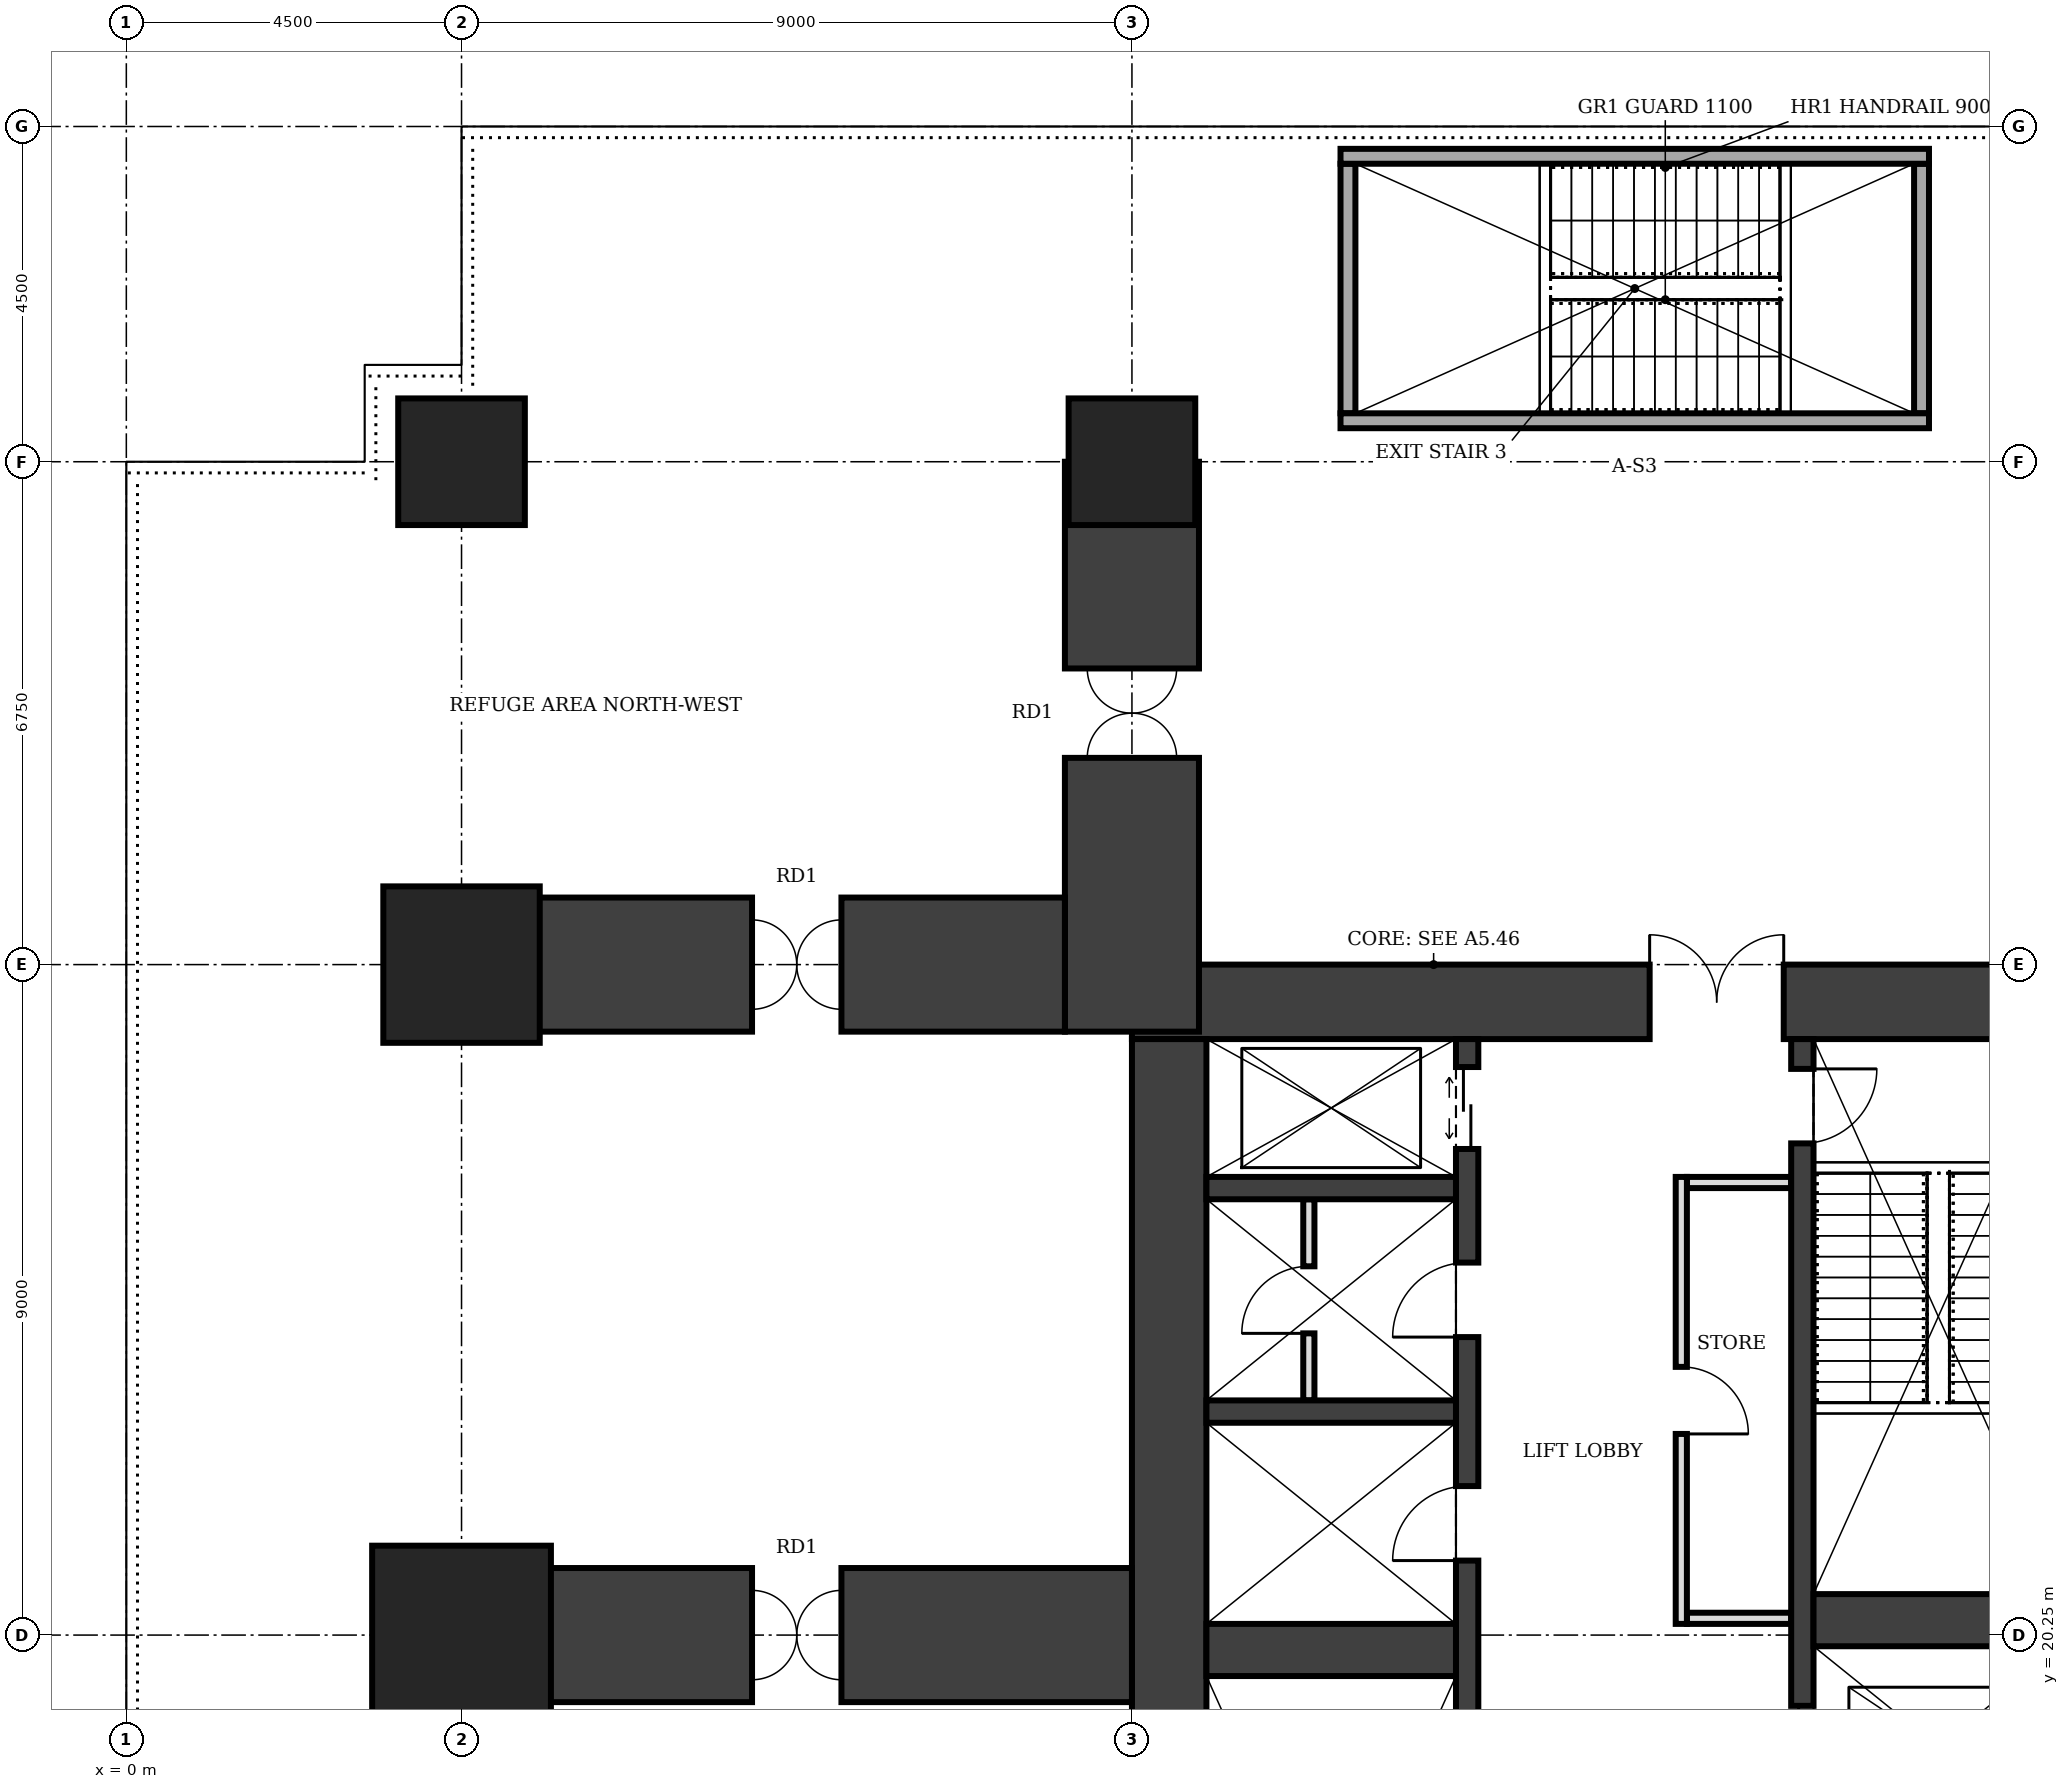
"""IFC4 building model, lengths in metres.
Left out: names, types, materials, properties, quantities, classifications, styles, units other than length and angle.
Written with IfcOpenShell. Run it as: python <this file> out.ifc"""

import sys

from ifc_helpers import new_model, si_unit, direction, frame, frame_2d, origin, origin_2d, place, context, subcontext, project, spatial, rectangle, extrude, element, fill, save


model = new_model("IFC4")
c1 = context("Model", 3, precision=1e-05, world=origin(), true_north=direction((0.0, 1.0)))
c2 = subcontext(c1, "Body", "Model", "MODEL_VIEW")
j1 = project(units=[si_unit("LENGTHUNIT", "METRE"), si_unit("PLANEANGLEUNIT", "RADIAN")], contexts=[c1])
p1 = place(None, origin())
s1 = spatial("IfcSite", under=j1, at=p1, CompositionType="ELEMENT")
p2 = place(p1, origin())
s2 = spatial("IfcBuilding", under=s1, at=p2, CompositionType="ELEMENT")
p3 = place(p2, frame((0.0, 0.0, 169.0)))
s3 = spatial("IfcBuildingStorey", under=s2, at=p3, CompositionType="ELEMENT", Elevation=169.0)
p4 = place(p3, frame((27.0, 28.75, 0.0), z_axis=(0.0, 0.0, 1.0), x_axis=(-1.0, 0.0, 0.0)))
e1 = element("IfcWall", 1, at=p4, inside=s3, PredefinedType="SHEAR", context=c2, shape_type="SweptSolid", body=[
    extrude(rectangle(XDim=13.5, YDim=1.0, at=frame_2d((6.75, 0.0))), origin(), (0.0, 0.0, 1.0), 8.0),
])
p5 = place(p4, frame((4.75, 0.0, 0.0)))
e2 = element("IfcOpeningElement", 2, at=p5, cuts=e1, PredefinedType="OPENING", context=c2, shape_type="SweptSolid", body=[
    extrude(rectangle(XDim=1.8, YDim=2.1, at=frame_2d((0.9, 1.05))), frame((0.0, 0.51, 0.0), z_axis=(0.0, -1.0, 0.0), x_axis=(1.0, 0.0, 0.0)), (0.0, 0.0, 1.0), 1.02),
])
p6 = place(p3, frame((14.0, 28.25, 0.0), z_axis=(0.0, 0.0, 1.0), x_axis=(0.0, -1.0, 0.0)))
e3 = element("IfcWall", 3, at=p6, inside=s3, PredefinedType="SHEAR", context=c2, shape_type="SweptSolid", body=[
    extrude(rectangle(XDim=16.0, YDim=1.0, at=frame_2d((8.0, 0.0))), origin(), (0.0, 0.0, 1.0), 8.0),
])
p7 = place(p3, frame((18.0, 12.25, 0.0), z_axis=(0.0, 0.0, 1.0), x_axis=(0.0, 1.0, 0.0)))
e4 = element("IfcWall", 4, at=p7, inside=s3, PredefinedType="SHEAR", context=c2, shape_type="SweptSolid", body=[
    extrude(rectangle(XDim=16.0, YDim=0.3, at=frame_2d((8.0, 0.0))), origin(), (0.0, 0.0, 1.0), 8.0),
])
p8 = place(p7, frame((0.4, 0.0, 0.0)))
e5 = element("IfcOpeningElement", 5, at=p8, cuts=e4, PredefinedType="OPENING", context=c2, shape_type="SweptSolid", body=[
    extrude(rectangle(XDim=1.0, YDim=2.1, at=frame_2d((0.5, 1.05))), frame((0.0, 0.16, 0.0), z_axis=(0.0, -1.0, 0.0), x_axis=(1.0, 0.0, 0.0)), (0.0, 0.0, 1.0), 0.32),
])
p9 = place(p7, frame((14.525, 0.0, 0.0)))
e6 = element("IfcOpeningElement", 6, at=p9, cuts=e4, PredefinedType="OPENING", context=c2, shape_type="SweptSolid", body=[
    extrude(rectangle(XDim=1.1, YDim=2.1, at=frame_2d((0.55, 1.05))), frame((0.0, 0.16, 0.0), z_axis=(0.0, -1.0, 0.0), x_axis=(1.0, 0.0, 0.0)), (0.0, 0.0, 1.0), 0.32),
])
p10 = place(p7, frame((9.0, 0.0, 0.0)))
e7 = element("IfcOpeningElement", 7, at=p10, cuts=e4, PredefinedType="OPENING", context=c2, shape_type="SweptSolid", body=[
    extrude(rectangle(XDim=1.0, YDim=2.1, at=frame_2d((0.5, 1.05))), frame((0.0, 0.16, 0.0), z_axis=(0.0, -1.0, 0.0), x_axis=(1.0, 0.0, 0.0)), (0.0, 0.0, 1.0), 0.32),
])
p11 = place(p7, frame((12.0, 0.0, 0.0)))
e8 = element("IfcOpeningElement", 8, at=p11, cuts=e4, PredefinedType="OPENING", context=c2, shape_type="SweptSolid", body=[
    extrude(rectangle(XDim=1.0, YDim=2.1, at=frame_2d((0.5, 1.05))), frame((0.0, 0.16, 0.0), z_axis=(0.0, -1.0, 0.0), x_axis=(1.0, 0.0, 0.0)), (0.0, 0.0, 1.0), 0.32),
])
p12 = place(p3, frame((22.5, 12.25, 0.0), z_axis=(0.0, 0.0, 1.0), x_axis=(0.0, 1.0, 0.0)))
e9 = element("IfcWall", 9, at=p12, inside=s3, PredefinedType="SHEAR", context=c2, shape_type="SweptSolid", body=[
    extrude(rectangle(XDim=16.0, YDim=0.3, at=frame_2d((8.0, 0.0))), origin(), (0.0, 0.0, 1.0), 8.0),
])
p13 = place(p12, frame((14.6, 0.0, 0.0)))
e10 = element("IfcOpeningElement", 10, at=p13, cuts=e9, PredefinedType="OPENING", context=c2, shape_type="SweptSolid", body=[
    extrude(rectangle(XDim=1.0, YDim=2.1, at=frame_2d((0.5, 1.05))), frame((0.0, 0.16, 0.0), z_axis=(0.0, -1.0, 0.0), x_axis=(1.0, 0.0, 0.0)), (0.0, 0.0, 1.0), 0.32),
])
p14 = place(p12, frame((0.375, 0.0, 0.0)))
e11 = element("IfcOpeningElement", 11, at=p14, cuts=e9, PredefinedType="OPENING", context=c2, shape_type="SweptSolid", body=[
    extrude(rectangle(XDim=1.1, YDim=2.1, at=frame_2d((0.55, 1.05))), frame((0.0, 0.16, 0.0), z_axis=(0.0, -1.0, 0.0), x_axis=(1.0, 0.0, 0.0)), (0.0, 0.0, 1.0), 0.32),
])
p15 = place(p12, frame((3.7, 0.0, 0.0)))
e12 = element("IfcOpeningElement", 12, at=p15, cuts=e9, PredefinedType="OPENING", context=c2, shape_type="SweptSolid", body=[
    extrude(rectangle(XDim=1.1, YDim=2.1, at=frame_2d((0.55, 1.05))), frame((0.0, 0.16, 0.0), z_axis=(0.0, -1.0, 0.0), x_axis=(1.0, 0.0, 0.0)), (0.0, 0.0, 1.0), 0.32),
])
p16 = place(p12, frame((5.95, 0.0, 0.0)))
e13 = element("IfcOpeningElement", 13, at=p16, cuts=e9, PredefinedType="OPENING", context=c2, shape_type="SweptSolid", body=[
    extrude(rectangle(XDim=1.1, YDim=2.1, at=frame_2d((0.55, 1.05))), frame((0.0, 0.16, 0.0), z_axis=(0.0, -1.0, 0.0), x_axis=(1.0, 0.0, 0.0)), (0.0, 0.0, 1.0), 0.32),
])
for number, where, z_axis, x_axis in (
    (14, (14.5, 20.05, 0.0), (0.0, 0.0, 1.0), (1.0, 0.0, 0.0)),
    (15, (22.65, 20.45, 0.0), (0.0, 0.0, 1.0), (1.0, 0.0, 0.0)),
):
    element("IfcWall", number, at=place(p3, frame(where, z_axis=z_axis, x_axis=x_axis)), inside=s3, PredefinedType="SHEAR", context=c2, shape_type="SweptSolid", body=[
        extrude(rectangle(XDim=3.35, YDim=0.7, at=frame_2d((1.675, 0.0))), origin(), (0.0, 0.0, 1.0), 8.0),
    ])
for number, where, z_axis, x_axis in (
    (16, (14.5, 23.25, 0.0), (0.0, 0.0, 1.0), (1.0, 0.0, 0.0)),
    (17, (14.5, 26.25, 0.0), (0.0, 0.0, 1.0), (1.0, 0.0, 0.0)),
):
    element("IfcWall", number, at=place(p3, frame(where, z_axis=z_axis, x_axis=x_axis)), inside=s3, PredefinedType="SHEAR", context=c2, shape_type="SweptSolid", body=[
        extrude(rectangle(XDim=3.35, YDim=0.3, at=frame_2d((1.675, 0.0))), origin(), (0.0, 0.0, 1.0), 8.0),
    ])
p17 = place(p3, frame((4.5, 20.25, 0.0), z_axis=(0.0, 0.0, 1.0), x_axis=(1.0, 0.0, 0.0)))
e18 = element("IfcColumn", 18, at=p17, inside=s3, PredefinedType="COLUMN", context=c2, shape_type="SweptSolid", body=[
    extrude(rectangle(XDim=2.4, YDim=2.4, at=origin_2d()), origin(), (0.0, 0.0, 1.0), 8.0),
])
p18 = place(p3, frame((4.5, 29.25, 0.0), z_axis=(0.0, 0.0, 1.0), x_axis=(1.0, 0.0, 0.0)))
e19 = element("IfcColumn", 19, at=p18, inside=s3, PredefinedType="COLUMN", context=c2, shape_type="SweptSolid", body=[
    extrude(rectangle(XDim=2.1, YDim=2.1, at=origin_2d()), origin(), (0.0, 0.0, 1.0), 8.0),
])
for number, where, z_axis, x_axis in (
    (20, (4.5, 36.0, 0.0), (0.0, 0.0, 1.0), (1.0, 0.0, 0.0)),
    (21, (13.5, 36.0, 0.0), (0.0, 0.0, 1.0), (1.0, 0.0, 0.0)),
):
    element("IfcColumn", number, at=place(p3, frame(where, z_axis=z_axis, x_axis=x_axis)), inside=s3, PredefinedType="COLUMN", context=c2, shape_type="SweptSolid", body=[
        extrude(rectangle(XDim=1.7, YDim=1.7, at=origin_2d()), origin(), (0.0, 0.0, 1.0), 8.0),
    ])
p19 = place(p3, frame((13.5, 28.35, 0.0), z_axis=(0.0, 0.0, 1.0), x_axis=(0.0, 1.0, 0.0)))
e22 = element("IfcWall", 22, at=p19, inside=s3, PredefinedType="SHEAR", context=c2, shape_type="SweptSolid", body=[
    extrude(rectangle(XDim=7.65, YDim=1.8, at=frame_2d((3.825, 0.0))), origin(), (0.0, 0.0, 1.0), 8.0),
])
p20 = place(p19, frame((3.675, 0.0, 0.0)))
e23 = element("IfcOpeningElement", 23, at=p20, cuts=e22, PredefinedType="OPENING", context=c2, shape_type="SweptSolid", body=[
    extrude(rectangle(XDim=1.2, YDim=2.1, at=frame_2d((0.6, 1.05))), frame((0.0, 0.91, 0.0), z_axis=(0.0, -1.0, 0.0), x_axis=(1.0, 0.0, 0.0)), (0.0, 0.0, 1.0), 1.82),
])
p21 = place(p3, frame((4.5, 20.25, 0.0), z_axis=(0.0, 0.0, 1.0), x_axis=(1.0, 0.0, 0.0)))
e24 = element("IfcWall", 24, at=p21, inside=s3, PredefinedType="SHEAR", context=c2, shape_type="SweptSolid", body=[
    extrude(rectangle(XDim=9.0, YDim=1.8, at=frame_2d((4.5, 0.0))), origin(), (0.0, 0.0, 1.0), 8.0),
])
p22 = place(p21, frame((3.9, 0.0, 0.0)))
e25 = element("IfcOpeningElement", 25, at=p22, cuts=e24, PredefinedType="OPENING", context=c2, shape_type="SweptSolid", body=[
    extrude(rectangle(XDim=1.2, YDim=2.1, at=frame_2d((0.6, 1.05))), frame((0.0, 0.91, 0.0), z_axis=(0.0, -1.0, 0.0), x_axis=(1.0, 0.0, 0.0)), (0.0, 0.0, 1.0), 1.82),
])
p23 = place(p3, frame((4.5, 29.25, 0.0), z_axis=(0.0, 0.0, 1.0), x_axis=(1.0, 0.0, 0.0)))
e26 = element("IfcWall", 26, at=p23, inside=s3, PredefinedType="SHEAR", context=c2, shape_type="SweptSolid", body=[
    extrude(rectangle(XDim=8.1, YDim=1.8, at=frame_2d((4.05, 0.0))), origin(), (0.0, 0.0, 1.0), 8.0),
])
p24 = place(p23, frame((3.9, 0.0, 0.0)))
e27 = element("IfcOpeningElement", 27, at=p24, cuts=e26, PredefinedType="OPENING", context=c2, shape_type="SweptSolid", body=[
    extrude(rectangle(XDim=1.2, YDim=2.1, at=frame_2d((0.6, 1.05))), frame((0.0, 0.91, 0.0), z_axis=(0.0, -1.0, 0.0), x_axis=(1.0, 0.0, 0.0)), (0.0, 0.0, 1.0), 1.82),
])
p25 = place(p3, frame((20.875, 20.4, 0.0), z_axis=(0.0, 0.0, 1.0), x_axis=(0.0, 1.0, 0.0)))
e28 = element("IfcWall", 28, at=p25, inside=s3, PredefinedType="PARTITIONING", context=c2, shape_type="SweptSolid", body=[
    extrude(rectangle(XDim=6.0, YDim=0.15, at=frame_2d((3.0, 0.0))), origin(), (0.0, 0.0, 1.0), 7.75),
])
p26 = place(p25, frame((2.55, 0.0, 0.0)))
e29 = element("IfcOpeningElement", 29, at=p26, cuts=e28, PredefinedType="OPENING", context=c2, shape_type="SweptSolid", body=[
    extrude(rectangle(XDim=0.9, YDim=2.1, at=frame_2d((0.45, 1.05))), frame((0.0, 0.085, 0.0), z_axis=(0.0, -1.0, 0.0), x_axis=(1.0, 0.0, 0.0)), (0.0, 0.0, 1.0), 0.17),
])
for number, where, z_axis, x_axis in (
    (30, (20.95, 20.475, 0.0), (0.0, 0.0, 1.0), (1.0, 0.0, 0.0)),
    (31, (20.95, 26.325, 0.0), (0.0, 0.0, 1.0), (1.0, 0.0, 0.0)),
):
    element("IfcWall", number, at=place(p3, frame(where, z_axis=z_axis, x_axis=x_axis)), inside=s3, PredefinedType="PARTITIONING", context=c2, shape_type="SweptSolid", body=[
        extrude(rectangle(XDim=1.4, YDim=0.15, at=frame_2d((0.7, 0.0))), origin(), (0.0, 0.0, 1.0), 7.75),
    ])
p27 = place(p3, frame((15.875, 23.4, 0.0), z_axis=(0.0, 0.0, 1.0), x_axis=(0.0, 1.0, 0.0)))
e32 = element("IfcWall", 32, at=p27, inside=s3, PredefinedType="PARTITIONING", context=c2, shape_type="SweptSolid", body=[
    extrude(rectangle(XDim=2.7, YDim=0.15, at=frame_2d((1.35, 0.0))), origin(), (0.0, 0.0, 1.0), 7.75),
])
p28 = place(p27, frame((0.9, 0.0, 0.0)))
e33 = element("IfcOpeningElement", 33, at=p28, cuts=e32, PredefinedType="OPENING", context=c2, shape_type="SweptSolid", body=[
    extrude(rectangle(XDim=0.9, YDim=2.1, at=frame_2d((0.45, 1.05))), frame((0.0, 0.085, 0.0), z_axis=(0.0, -1.0, 0.0), x_axis=(1.0, 0.0, 0.0)), (0.0, 0.0, 1.0), 0.17),
])
for number, where, z_axis, x_axis in (
    (34, (16.3, 36.55, 0.0), (0.0, 0.0, 1.0), (1.0, 0.0, 0.0)),
    (35, (16.3, 40.1, 0.0), (0.0, 0.0, 1.0), (1.0, 0.0, 0.0)),
):
    element("IfcWall", number, at=place(p3, frame(where, z_axis=z_axis, x_axis=x_axis)), inside=s3, PredefinedType="SOLIDWALL", context=c2, shape_type="SweptSolid", body=[
        extrude(rectangle(XDim=7.9, YDim=0.2, at=frame_2d((3.95, 0.0))), origin(), (0.0, 0.0, 1.0), 7.75),
    ])
for number, where, z_axis, x_axis in (
    (36, (16.4, 36.65, 0.0), (0.0, 0.0, 1.0), (0.0, 1.0, 0.0)),
    (37, (24.1, 36.65, 0.0), (0.0, 0.0, 1.0), (0.0, 1.0, 0.0)),
):
    element("IfcWall", number, at=place(p3, frame(where, z_axis=z_axis, x_axis=x_axis)), inside=s3, PredefinedType="SOLIDWALL", context=c2, shape_type="SweptSolid", body=[
        extrude(rectangle(XDim=3.35, YDim=0.2, at=frame_2d((1.675, 0.0))), origin(), (0.0, 0.0, 1.0), 7.75),
    ])
p29 = place(p5, frame((1.8, 0.0, 0.0), z_axis=(0.0, 0.0, 1.0), x_axis=(-1.0, 0.0, 0.0)))
e38 = element("IfcDoor", 38, at=p29, inside=s3, OperationType="DOUBLE_DOOR_SINGLE_SWING", PredefinedType="DOOR", context=c2, shape_type="SweptSolid", body=[
    extrude(rectangle(XDim=1.8, YDim=2.1, at=frame_2d((0.9, 1.05))), frame((0.0, 0.025, 0.0), z_axis=(0.0, -1.0, 0.0), x_axis=(1.0, 0.0, 0.0)), (0.0, 0.0, 1.0), 0.05),
])
fill(e2, e38)
p30 = place(p13, frame((1.0, 0.0, 0.0), z_axis=(0.0, 0.0, 1.0), x_axis=(-1.0, 0.0, 0.0)))
e39 = element("IfcDoor", 39, at=p30, inside=s3, OperationType="SINGLE_SWING_LEFT", PredefinedType="DOOR", context=c2, shape_type="SweptSolid", body=[
    extrude(rectangle(XDim=1.0, YDim=2.1, at=frame_2d((0.5, 1.05))), frame((0.0, 0.025, 0.0), z_axis=(0.0, -1.0, 0.0), x_axis=(1.0, 0.0, 0.0)), (0.0, 0.0, 1.0), 0.05),
])
fill(e10, e39)
p31 = place(p9, origin())
e40 = element("IfcDoor", 40, at=p31, inside=s3, OperationType="DOUBLE_DOOR_SLIDING", PredefinedType="DOOR", context=c2, shape_type="SweptSolid", body=[
    extrude(rectangle(XDim=1.1, YDim=2.1, at=frame_2d((0.55, 1.05))), frame((0.0, 0.025, 0.0), z_axis=(0.0, -1.0, 0.0), x_axis=(1.0, 0.0, 0.0)), (0.0, 0.0, 1.0), 0.05),
])
fill(e6, e40)
p32 = place(p16, origin())
e41 = element("IfcDoor", 41, at=p32, inside=s3, OperationType="DOUBLE_DOOR_SLIDING", PredefinedType="DOOR", context=c2, shape_type="SweptSolid", body=[
    extrude(rectangle(XDim=1.1, YDim=2.1, at=frame_2d((0.55, 1.05))), frame((0.0, 0.025, 0.0), z_axis=(0.0, -1.0, 0.0), x_axis=(1.0, 0.0, 0.0)), (0.0, 0.0, 1.0), 0.05),
])
fill(e13, e41)
p33 = place(p26, frame((0.9, 0.0, 0.0), z_axis=(0.0, 0.0, 1.0), x_axis=(-1.0, 0.0, 0.0)))
e42 = element("IfcDoor", 42, at=p33, inside=s3, OperationType="SINGLE_SWING_RIGHT", PredefinedType="DOOR", context=c2, shape_type="SweptSolid", body=[
    extrude(rectangle(XDim=0.9, YDim=2.1, at=frame_2d((0.45, 1.05))), frame((0.0, 0.025, 0.0), z_axis=(0.0, -1.0, 0.0), x_axis=(1.0, 0.0, 0.0)), (0.0, 0.0, 1.0), 0.05),
])
fill(e29, e42)
p34 = place(p10, origin())
e43 = element("IfcDoor", 43, at=p34, inside=s3, OperationType="SINGLE_SWING_LEFT", PredefinedType="DOOR", context=c2, shape_type="SweptSolid", body=[
    extrude(rectangle(XDim=1.0, YDim=2.1, at=frame_2d((0.5, 1.05))), frame((0.0, 0.025, 0.0), z_axis=(0.0, -1.0, 0.0), x_axis=(1.0, 0.0, 0.0)), (0.0, 0.0, 1.0), 0.05),
])
fill(e7, e43)
p35 = place(p11, origin())
e44 = element("IfcDoor", 44, at=p35, inside=s3, OperationType="SINGLE_SWING_LEFT", PredefinedType="DOOR", context=c2, shape_type="SweptSolid", body=[
    extrude(rectangle(XDim=1.0, YDim=2.1, at=frame_2d((0.5, 1.05))), frame((0.0, 0.025, 0.0), z_axis=(0.0, -1.0, 0.0), x_axis=(1.0, 0.0, 0.0)), (0.0, 0.0, 1.0), 0.05),
])
fill(e8, e44)
p36 = place(p28, origin())
e45 = element("IfcDoor", 45, at=p36, inside=s3, OperationType="SINGLE_SWING_LEFT", PredefinedType="DOOR", context=c2, shape_type="SweptSolid", body=[
    extrude(rectangle(XDim=0.9, YDim=2.1, at=frame_2d((0.45, 1.05))), frame((0.0, 0.025, 0.0), z_axis=(0.0, -1.0, 0.0), x_axis=(1.0, 0.0, 0.0)), (0.0, 0.0, 1.0), 0.05),
])
fill(e33, e45)
p37 = place(p20, origin())
e46 = element("IfcDoor", 46, at=p37, inside=s3, OperationType="DOUBLE_DOOR_DOUBLE_SWING", PredefinedType="DOOR", context=c2, shape_type="SweptSolid", body=[
    extrude(rectangle(XDim=1.2, YDim=2.1, at=frame_2d((0.6, 1.05))), frame((0.0, 0.025, 0.0), z_axis=(0.0, -1.0, 0.0), x_axis=(1.0, 0.0, 0.0)), (0.0, 0.0, 1.0), 0.05),
])
fill(e23, e46)
p38 = place(p22, origin())
e47 = element("IfcDoor", 47, at=p38, inside=s3, OperationType="DOUBLE_DOOR_DOUBLE_SWING", PredefinedType="DOOR", context=c2, shape_type="SweptSolid", body=[
    extrude(rectangle(XDim=1.2, YDim=2.1, at=frame_2d((0.6, 1.05))), frame((0.0, 0.025, 0.0), z_axis=(0.0, -1.0, 0.0), x_axis=(1.0, 0.0, 0.0)), (0.0, 0.0, 1.0), 0.05),
])
fill(e25, e47)
p39 = place(p24, origin())
e48 = element("IfcDoor", 48, at=p39, inside=s3, OperationType="DOUBLE_DOOR_DOUBLE_SWING", PredefinedType="DOOR", context=c2, shape_type="SweptSolid", body=[
    extrude(rectangle(XDim=1.2, YDim=2.1, at=frame_2d((0.6, 1.05))), frame((0.0, 0.025, 0.0), z_axis=(0.0, -1.0, 0.0), x_axis=(1.0, 0.0, 0.0)), (0.0, 0.0, 1.0), 0.05),
])
fill(e27, e48)
save(model, sys.argv[1])
